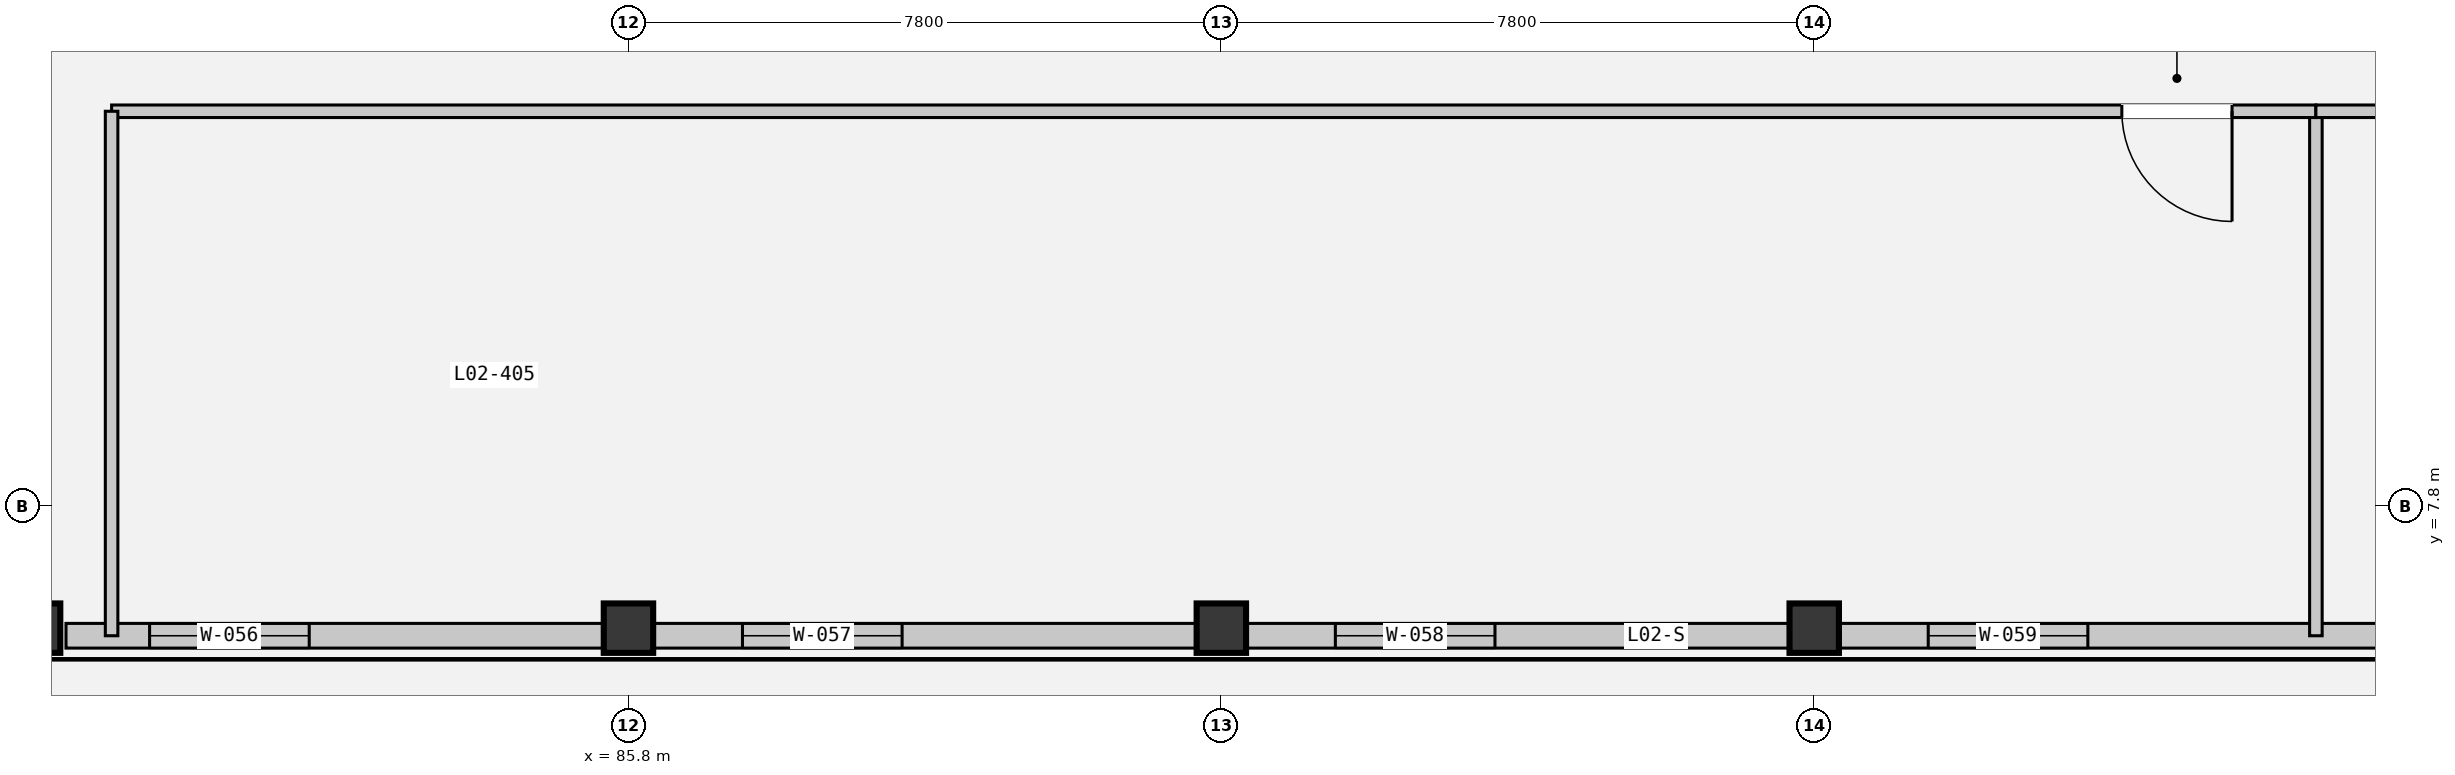
"""IFC4 building model, lengths in metres.
Left out: names, types, materials, properties, quantities, classifications, styles, units other than length and angle.
Written with IfcOpenShell. Run it as: python <this file> out.ifc"""

import sys

from ifc_helpers import new_model, si_unit, direction, frame, frame_2d, origin, origin_2d, place, context, subcontext, project, spatial, rectangle, extrude, element, fill, save


model = new_model("IFC4")
c1 = context("Model", 3, precision=1e-05, world=origin(), true_north=direction((0.0, 1.0)))
c2 = subcontext(c1, "Body", "Model", "MODEL_VIEW")
j1 = project(units=[si_unit("LENGTHUNIT", "METRE"), si_unit("PLANEANGLEUNIT", "RADIAN")], contexts=[c1])
p1 = place(None, origin())
s1 = spatial("IfcSite", under=j1, at=p1, CompositionType="ELEMENT")
p2 = place(p1, origin())
s2 = spatial("IfcBuilding", under=s1, at=p2, CompositionType="ELEMENT")
p3 = place(p2, frame((0.0, 0.0, 10.2)))
s3 = spatial("IfcBuildingStorey", under=s2, at=p3, CompositionType="ELEMENT", Elevation=10.2)
for number, where, z_axis, x_axis in (
    (1, (78.0, 6.2, 0.0), (0.0, 0.0, 1.0), (1.0, 0.0, 0.0)),
    (2, (85.8, 6.2, 0.0), (0.0, 0.0, 1.0), (1.0, 0.0, 0.0)),
    (3, (93.6, 6.2, 0.0), (0.0, 0.0, 1.0), (1.0, 0.0, 0.0)),
    (4, (101.4, 6.2, 0.0), (0.0, 0.0, 1.0), (1.0, 0.0, 0.0)),
):
    element("IfcColumn", number, at=place(p3, frame(where, z_axis=z_axis, x_axis=x_axis)), inside=s3, PredefinedType="COLUMN", context=c2, shape_type="SweptSolid", body=[
        extrude(rectangle(XDim=0.65, YDim=0.65, at=origin_2d()), origin(), (0.0, 0.0, 1.0), 4.8),
    ])
p4 = place(p3, frame((78.4, 6.1, 0.0), z_axis=(0.0, 0.0, 1.0), x_axis=(1.0, 0.0, 0.0)))
e5 = element("IfcWall", 5, at=p4, inside=s3, PredefinedType="SOLIDWALL", context=c2, shape_type="SweptSolid", body=[
    extrude(rectangle(XDim=78.5, YDim=0.325, at=frame_2d((39.25, 0.0))), origin(), (0.0, 0.0, 1.0), 3.86),
])
p5 = place(p4, frame((1.1, 0.0, 0.78)))
e6 = element("IfcOpeningElement", 6, at=p5, cuts=e5, PredefinedType="OPENING", context=c2, shape_type="SweptSolid", body=[
    extrude(rectangle(XDim=2.1, YDim=2.6, at=frame_2d((1.05, 1.3))), frame((0.0, 0.172, 0.0), z_axis=(0.0, -1.0, 0.0), x_axis=(1.0, 0.0, 0.0)), (0.0, 0.0, 1.0), 0.345),
])
p6 = place(p4, frame((8.9, 0.0, 0.78)))
e7 = element("IfcOpeningElement", 7, at=p6, cuts=e5, PredefinedType="OPENING", context=c2, shape_type="SweptSolid", body=[
    extrude(rectangle(XDim=2.1, YDim=2.6, at=frame_2d((1.05, 1.3))), frame((0.0, 0.172, 0.0), z_axis=(0.0, -1.0, 0.0), x_axis=(1.0, 0.0, 0.0)), (0.0, 0.0, 1.0), 0.345),
])
p7 = place(p4, frame((16.7, 0.0, 0.78)))
e8 = element("IfcOpeningElement", 8, at=p7, cuts=e5, PredefinedType="OPENING", context=c2, shape_type="SweptSolid", body=[
    extrude(rectangle(XDim=2.1, YDim=2.6, at=frame_2d((1.05, 1.3))), frame((0.0, 0.172, 0.0), z_axis=(0.0, -1.0, 0.0), x_axis=(1.0, 0.0, 0.0)), (0.0, 0.0, 1.0), 0.345),
])
p8 = place(p4, frame((24.5, 0.0, 0.78)))
e9 = element("IfcOpeningElement", 9, at=p8, cuts=e5, PredefinedType="OPENING", context=c2, shape_type="SweptSolid", body=[
    extrude(rectangle(XDim=2.1, YDim=2.6, at=frame_2d((1.05, 1.3))), frame((0.0, 0.172, 0.0), z_axis=(0.0, -1.0, 0.0), x_axis=(1.0, 0.0, 0.0)), (0.0, 0.0, 1.0), 0.345),
])
p9 = place(p4, frame((32.3, 0.0, 0.78)))
e10 = element("IfcOpeningElement", 10, at=p9, cuts=e5, PredefinedType="OPENING", context=c2, shape_type="SweptSolid", body=[
    extrude(rectangle(XDim=2.1, YDim=2.6, at=frame_2d((1.05, 1.3))), frame((0.0, 0.172, 0.0), z_axis=(0.0, -1.0, 0.0), x_axis=(1.0, 0.0, 0.0)), (0.0, 0.0, 1.0), 0.345),
])
p10 = place(p4, frame((40.1, 0.0, 0.78)))
e11 = element("IfcOpeningElement", 11, at=p10, cuts=e5, PredefinedType="OPENING", context=c2, shape_type="SweptSolid", body=[
    extrude(rectangle(XDim=2.1, YDim=2.6, at=frame_2d((1.05, 1.3))), frame((0.0, 0.172, 0.0), z_axis=(0.0, -1.0, 0.0), x_axis=(1.0, 0.0, 0.0)), (0.0, 0.0, 1.0), 0.345),
])
p11 = place(p4, frame((47.9, 0.0, 0.78)))
e12 = element("IfcOpeningElement", 12, at=p11, cuts=e5, PredefinedType="OPENING", context=c2, shape_type="SweptSolid", body=[
    extrude(rectangle(XDim=2.1, YDim=2.6, at=frame_2d((1.05, 1.3))), frame((0.0, 0.172, 0.0), z_axis=(0.0, -1.0, 0.0), x_axis=(1.0, 0.0, 0.0)), (0.0, 0.0, 1.0), 0.345),
])
p12 = place(p4, frame((55.7, 0.0, 0.78)))
e13 = element("IfcOpeningElement", 13, at=p12, cuts=e5, PredefinedType="OPENING", context=c2, shape_type="SweptSolid", body=[
    extrude(rectangle(XDim=2.1, YDim=2.6, at=frame_2d((1.05, 1.3))), frame((0.0, 0.172, 0.0), z_axis=(0.0, -1.0, 0.0), x_axis=(1.0, 0.0, 0.0)), (0.0, 0.0, 1.0), 0.345),
])
p13 = place(p4, frame((63.5, 0.0, 0.78)))
e14 = element("IfcOpeningElement", 14, at=p13, cuts=e5, PredefinedType="OPENING", context=c2, shape_type="SweptSolid", body=[
    extrude(rectangle(XDim=2.1, YDim=2.6, at=frame_2d((1.05, 1.3))), frame((0.0, 0.172, 0.0), z_axis=(0.0, -1.0, 0.0), x_axis=(1.0, 0.0, 0.0)), (0.0, 0.0, 1.0), 0.345),
])
p14 = place(p4, frame((71.3, 0.0, 0.78)))
e15 = element("IfcOpeningElement", 15, at=p14, cuts=e5, PredefinedType="OPENING", context=c2, shape_type="SweptSolid", body=[
    extrude(rectangle(XDim=2.1, YDim=2.6, at=frame_2d((1.05, 1.3))), frame((0.0, 0.172, 0.0), z_axis=(0.0, -1.0, 0.0), x_axis=(1.0, 0.0, 0.0)), (0.0, 0.0, 1.0), 0.345),
])
p15 = place(p3, frame((108.0, 6.1, 0.0), z_axis=(0.0, 0.0, 1.0), x_axis=(0.0, 1.0, 0.0)))
e16 = element("IfcWall", 16, at=p15, inside=s3, PredefinedType="PARTITIONING", context=c2, shape_type="SweptSolid", body=[
    extrude(rectangle(XDim=6.9, YDim=0.165, at=frame_2d((3.45, 0.0))), origin(), (0.0, 0.0, 1.0), 3.45),
])
p16 = place(p3, frame((108.0, 13.0, 0.0), z_axis=(0.0, 0.0, 1.0), x_axis=(-1.0, 0.0, 0.0)))
e17 = element("IfcWall", 17, at=p16, inside=s3, PredefinedType="PARTITIONING", context=c2, shape_type="SweptSolid", body=[
    extrude(rectangle(XDim=29.0, YDim=0.165, at=frame_2d((14.5, 0.0))), origin(), (0.0, 0.0, 1.0), 3.45),
])
p17 = place(p16, frame((1.103, 0.0, 0.0)))
e18 = element("IfcOpeningElement", 18, at=p17, cuts=e17, PredefinedType="OPENING", context=c2, shape_type="SweptSolid", body=[
    extrude(rectangle(XDim=1.45, YDim=2.2, at=frame_2d((0.725, 1.1))), frame((0.0, 0.093, 0.0), z_axis=(0.0, -1.0, 0.0), x_axis=(1.0, 0.0, 0.0)), (0.0, 0.0, 1.0), 0.185),
])
p18 = place(p3, frame((79.0, 13.0, 0.0), z_axis=(0.0, 0.0, 1.0), x_axis=(0.0, -1.0, 0.0)))
e19 = element("IfcWall", 19, at=p18, inside=s3, PredefinedType="PARTITIONING", context=c2, shape_type="SweptSolid", body=[
    extrude(rectangle(XDim=6.9, YDim=0.165, at=frame_2d((3.45, 0.0))), origin(), (0.0, 0.0, 1.0), 3.45),
])
p19 = place(p3, frame((132.6, 13.0, 0.0), z_axis=(0.0, 0.0, 1.0), x_axis=(-1.0, 0.0, 0.0)))
e20 = element("IfcWall", 20, at=p19, inside=s3, PredefinedType="PARTITIONING", context=c2, shape_type="SweptSolid", body=[
    extrude(rectangle(XDim=24.6, YDim=0.165, at=frame_2d((12.3, 0.0))), origin(), (0.0, 0.0, 1.0), 3.45),
])
p20 = place(p19, frame((1.104, 0.0, 0.0)))
e21 = element("IfcOpeningElement", 21, at=p20, cuts=e20, PredefinedType="OPENING", context=c2, shape_type="SweptSolid", body=[
    extrude(rectangle(XDim=1.45, YDim=2.2, at=frame_2d((0.725, 1.1))), frame((0.0, 0.093, 0.0), z_axis=(0.0, -1.0, 0.0), x_axis=(1.0, 0.0, 0.0)), (0.0, 0.0, 1.0), 0.185),
])
p21 = place(p5, origin())
e22 = element("IfcWindow", 22, at=p21, inside=s3, PartitioningType="SINGLE_PANEL", PredefinedType="WINDOW", context=c2, shape_type="SweptSolid", body=[
    extrude(rectangle(XDim=2.1, YDim=2.6, at=frame_2d((1.05, 1.3))), frame((0.0, 0.03, 0.0), z_axis=(0.0, -1.0, 0.0), x_axis=(1.0, 0.0, 0.0)), (0.0, 0.0, 1.0), 0.06),
])
fill(e6, e22)
p22 = place(p6, origin())
e23 = element("IfcWindow", 23, at=p22, inside=s3, PartitioningType="SINGLE_PANEL", PredefinedType="WINDOW", context=c2, shape_type="SweptSolid", body=[
    extrude(rectangle(XDim=2.1, YDim=2.6, at=frame_2d((1.05, 1.3))), frame((0.0, 0.03, 0.0), z_axis=(0.0, -1.0, 0.0), x_axis=(1.0, 0.0, 0.0)), (0.0, 0.0, 1.0), 0.06),
])
fill(e7, e23)
p23 = place(p7, origin())
e24 = element("IfcWindow", 24, at=p23, inside=s3, PartitioningType="SINGLE_PANEL", PredefinedType="WINDOW", context=c2, shape_type="SweptSolid", body=[
    extrude(rectangle(XDim=2.1, YDim=2.6, at=frame_2d((1.05, 1.3))), frame((0.0, 0.03, 0.0), z_axis=(0.0, -1.0, 0.0), x_axis=(1.0, 0.0, 0.0)), (0.0, 0.0, 1.0), 0.06),
])
fill(e8, e24)
p24 = place(p8, origin())
e25 = element("IfcWindow", 25, at=p24, inside=s3, PartitioningType="SINGLE_PANEL", PredefinedType="WINDOW", context=c2, shape_type="SweptSolid", body=[
    extrude(rectangle(XDim=2.1, YDim=2.6, at=frame_2d((1.05, 1.3))), frame((0.0, 0.03, 0.0), z_axis=(0.0, -1.0, 0.0), x_axis=(1.0, 0.0, 0.0)), (0.0, 0.0, 1.0), 0.06),
])
fill(e9, e25)
p25 = place(p17, origin())
e26 = element("IfcDoor", 26, at=p25, inside=s3, OperationType="SINGLE_SWING_RIGHT", PredefinedType="DOOR", context=c2, shape_type="SweptSolid", body=[
    extrude(rectangle(XDim=1.45, YDim=2.2, at=frame_2d((0.725, 1.1))), frame((0.0, 0.025, 0.0), z_axis=(0.0, -1.0, 0.0), x_axis=(1.0, 0.0, 0.0)), (0.0, 0.0, 1.0), 0.05),
])
fill(e18, e26)
save(model, sys.argv[1])
